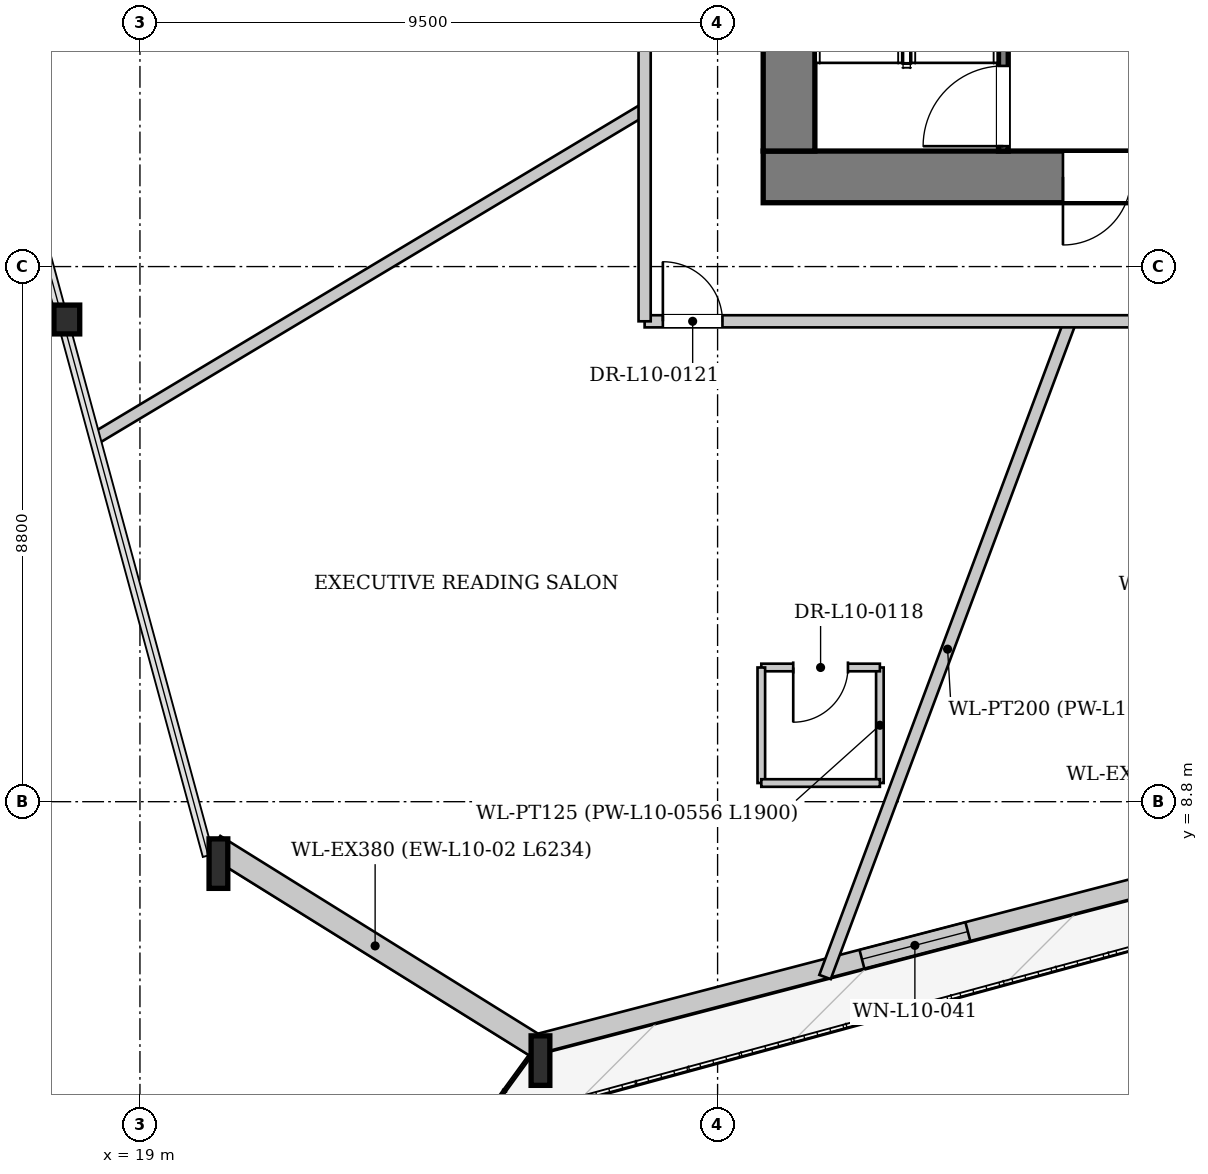
"""IFC4 building model, lengths in metres.
Left out: names, types, materials, properties, quantities, classifications, styles, units other than length and angle.
Written with IfcOpenShell. Run it as: python <this file> out.ifc"""

import sys

from ifc_helpers import new_model, si_unit, direction, frame, frame_2d, origin, origin_2d, place, context, subcontext, project, spatial, rectangle, i_section, extrude, source, transform, mapped, element, fill, save


model = new_model("IFC4")
c1 = context("Model", 3, precision=1e-05, world=origin(), true_north=direction((0.0, 1.0)))
c2 = subcontext(c1, "Body", "Model", "MODEL_VIEW")
j1 = project(units=[si_unit("LENGTHUNIT", "METRE"), si_unit("PLANEANGLEUNIT", "RADIAN")], contexts=[c1])
p1 = place(None, origin())
s1 = spatial("IfcSite", under=j1, at=p1, CompositionType="ELEMENT")
p2 = place(p1, origin())
s2 = spatial("IfcBuilding", under=s1, at=p2, CompositionType="ELEMENT")
p3 = place(p2, frame((0.0, 0.0, 43.5)))
s3 = spatial("IfcBuildingStorey", under=s2, at=p3, CompositionType="ELEMENT", Elevation=43.5)
m1 = source(origin(), c2, "Body", "SweptSolid", [
    extrude(i_section(OverallWidth=0.424, OverallDepth=0.474, WebThickness=0.043, FlangeThickness=0.068, at=origin_2d()), origin(), (0.0, 0.0, 1.0), 3.406),
])
p4 = place(p3, frame((17.685, 16.885, 0.0), z_axis=(0.065720082307, -0.090947420336, 0.993684777742), x_axis=(0.810527620102, 0.585700415787, 0.0)))
e1 = element("IfcColumn", 1, at=p4, inside=s3, PredefinedType="COLUMN", context=c2, shape_type="MappedRepresentation", body=[
    mapped(m1, transform((0.0, 0.0, 0.0), x_axis=(1.0, 0.0, 0.0), y_axis=(0.0, 1.0, 0.0), z_axis=(0.0, 0.0, 1.0), scale=1.0)),
])
m2 = source(origin(), c2, "Body", "SweptSolid", [
    extrude(i_section(OverallWidth=0.308, OverallDepth=0.814, WebThickness=0.021, FlangeThickness=0.04, at=origin_2d()), origin(), (0.0, 0.0, 1.0), 3.412),
])
p5 = place(p3, frame((20.121, 7.915, 0.0), z_axis=(0.099448612352, -0.077984883067, 0.99198202177), x_axis=(0.617071206002, 0.786907317746, 0.0)))
e2 = element("IfcColumn", 2, at=p5, inside=s3, PredefinedType="COLUMN", context=c2, shape_type="MappedRepresentation", body=[
    mapped(m2, transform((0.0, 0.0, 0.0), x_axis=(1.0, 0.0, 0.0), y_axis=(0.0, 1.0, 0.0), z_axis=(0.0, 0.0, 1.0), scale=1.0)),
])
m3 = source(origin(), c2, "Body", "SweptSolid", [
    extrude(i_section(OverallWidth=0.308, OverallDepth=0.814, WebThickness=0.021, FlangeThickness=0.04, at=origin_2d()), origin(), (0.0, 0.0, 1.0), 3.406),
])
p6 = place(p3, frame((25.414, 4.62, 0.0), z_axis=(0.101705377608, -0.045799673215, 0.993759732581), x_axis=(0.410605127545, 0.911813264454, 0.0)))
e3 = element("IfcColumn", 3, at=p6, inside=s3, PredefinedType="COLUMN", context=c2, shape_type="MappedRepresentation", body=[
    mapped(m3, transform((0.0, 0.0, 0.0), x_axis=(1.0, 0.0, 0.0), y_axis=(0.0, 1.0, 0.0), z_axis=(0.0, 0.0, 1.0), scale=1.0)),
])
p7 = place(p3, frame((49.134, 10.972, 0.0), z_axis=(0.0, 0.0, 1.0), x_axis=(-0.967626668542, -0.252385875847, 0.0)))
e4 = element("IfcWall", 4, at=p7, inside=s3, PredefinedType="SOLIDWALL", context=c2, shape_type="SweptSolid", body=[
    extrude(rectangle(XDim=24.556, YDim=0.32, at=frame_2d((12.278, 0.0))), origin(), (0.0, 0.0, 1.0), 2.592),
])
p8 = place(p7, frame((7.308, 0.0, 0.0)))
e5 = element("IfcOpeningElement", 5, at=p8, cuts=e4, PredefinedType="OPENING", context=c2, shape_type="SweptSolid", body=[
    extrude(rectangle(XDim=1.1, YDim=2.3, at=frame_2d((0.55, 1.15))), frame((0.0, 0.17, 0.0), z_axis=(0.0, -1.0, 0.0), x_axis=(1.0, 0.0, 0.0)), (0.0, 0.0, 1.0), 0.34),
])
p9 = place(p7, frame((17.071, 0.0, 0.272)))
e6 = element("IfcOpeningElement", 6, at=p9, cuts=e4, PredefinedType="OPENING", context=c2, shape_type="SweptSolid", body=[
    extrude(rectangle(XDim=1.8, YDim=2.2, at=frame_2d((0.9, 1.1))), frame((0.0, 0.17, 0.0), z_axis=(0.0, -1.0, 0.0), x_axis=(1.0, 0.0, 0.0)), (0.0, 0.0, 1.0), 0.34),
])
p10 = place(p3, frame((25.514, 4.781, 0.0), z_axis=(0.0, 0.0, 1.0), x_axis=(-0.848982430353, 0.528421075424, 0.0)))
e7 = element("IfcWall", 7, at=p10, inside=s3, PredefinedType="SOLIDWALL", context=c2, shape_type="SweptSolid", body=[
    extrude(rectangle(XDim=6.234, YDim=0.38, at=frame_2d((3.117, 0.0))), origin(), (0.0, 0.0, 1.0), 2.592),
])
p11 = place(p3, frame((46.75, 19.075, 0.0), z_axis=(0.0, 0.0, 1.0), x_axis=(-1.0, 0.0, 0.0)))
e8 = element("IfcWall", 8, at=p11, inside=s3, PredefinedType="SHEAR", context=c2, shape_type="SweptSolid", body=[
    extrude(rectangle(XDim=17.5, YDim=0.85, at=frame_2d((8.75, 0.0))), origin(), (0.0, 0.0, 1.0), 3.3),
])
p12 = place(p11, frame((4.95, 0.0, 0.0)))
e9 = element("IfcOpeningElement", 9, at=p12, cuts=e8, PredefinedType="OPENING", context=c2, shape_type="SweptSolid", body=[
    extrude(rectangle(XDim=1.12, YDim=2.25, at=frame_2d((0.56, 1.125))), frame((0.0, 0.435, 0.0), z_axis=(0.0, -1.0, 0.0), x_axis=(1.0, 0.0, 0.0)), (0.0, 0.0, 1.0), 0.87),
])
p13 = place(p11, frame((11.45, 0.0, 0.0)))
e10 = element("IfcOpeningElement", 10, at=p13, cuts=e8, PredefinedType="OPENING", context=c2, shape_type="SweptSolid", body=[
    extrude(rectangle(XDim=1.12, YDim=2.25, at=frame_2d((0.56, 1.125))), frame((0.0, 0.435, 0.0), z_axis=(0.0, -1.0, 0.0), x_axis=(1.0, 0.0, 0.0)), (0.0, 0.0, 1.0), 0.87),
])
p14 = place(p3, frame((29.675, 19.5, 0.0), z_axis=(0.0, 0.0, 1.0), x_axis=(0.0, 1.0, 0.0)))
e11 = element("IfcWall", 11, at=p14, inside=s3, PredefinedType="SHEAR", context=c2, shape_type="SweptSolid", body=[
    extrude(rectangle(XDim=14.2, YDim=0.85, at=frame_2d((7.1, 0.0))), origin(), (0.0, 0.0, 1.0), 3.3),
])
p15 = place(p14, frame((7.42, 0.0, 0.0)))
e12 = element("IfcOpeningElement", 12, at=p15, cuts=e11, PredefinedType="OPENING", context=c2, shape_type="SweptSolid", body=[
    extrude(rectangle(XDim=1.6, YDim=2.2, at=frame_2d((0.8, 1.1))), frame((0.0, 0.435, 0.0), z_axis=(0.0, -1.0, 0.0), x_axis=(1.0, 0.0, 0.0)), (0.0, 0.0, 1.0), 0.87),
])
p16 = place(p3, frame((33.2, 19.5, 0.0), z_axis=(0.0, 0.0, 1.0), x_axis=(0.0, 1.0, 0.0)))
e13 = element("IfcWall", 13, at=p16, inside=s3, PredefinedType="PARTITIONING", context=c2, shape_type="SweptSolid", body=[
    extrude(rectangle(XDim=7.46, YDim=0.16, at=frame_2d((3.73, 0.0))), origin(), (0.0, 0.0, 1.0), 3.3),
])
p17 = place(p16, frame((0.08, 0.0, 0.0)))
e14 = element("IfcOpeningElement", 14, at=p17, cuts=e13, PredefinedType="OPENING", context=c2, shape_type="SweptSolid", body=[
    extrude(rectangle(XDim=1.32, YDim=2.2, at=frame_2d((0.66, 1.1))), frame((0.0, 0.09, 0.0), z_axis=(0.0, -1.0, 0.0), x_axis=(1.0, 0.0, 0.0)), (0.0, 0.0, 1.0), 0.18),
])
p18 = place(p3, frame((34.299, 16.7, 0.0), z_axis=(0.0, 0.0, 1.0), x_axis=(-0.350212246301, -0.936670370269, 0.0)))
e15 = element("IfcWall", 15, at=p18, inside=s3, PredefinedType="PARTITIONING", context=c2, shape_type="SweptSolid", body=[
    extrude(rectangle(XDim=11.512, YDim=0.2, at=frame_2d((5.756, 0.0))), origin(), (0.0, 0.0, 1.0), 3.3),
])
p19 = place(p3, frame((27.3, 20.189, 0.0), z_axis=(0.0, 0.0, 1.0), x_axis=(-0.857808451078, -0.51396951394, 0.0)))
e16 = element("IfcWall", 16, at=p19, inside=s3, PredefinedType="PARTITIONING", context=c2, shape_type="SweptSolid", body=[
    extrude(rectangle(XDim=10.509, YDim=0.2, at=frame_2d((5.254, 0.0))), origin(), (0.0, 0.0, 1.0), 3.3),
])
p20 = place(p3, frame((31.169, 9.107, 0.0), z_axis=(0.0, 0.0, 1.0), x_axis=(0.0, 1.0, 0.0)))
e17 = element("IfcWall", 17, at=p20, inside=s3, PredefinedType="PARTITIONING", context=c2, shape_type="SweptSolid", body=[
    extrude(rectangle(XDim=1.9, YDim=0.125, at=frame_2d((0.95, 0.0))), origin(), (0.0, 0.0, 1.0), 3.3),
])
p21 = place(p3, frame((31.169, 11.007, 0.0), z_axis=(0.0, 0.0, 1.0), x_axis=(-1.0, 0.0, 0.0)))
e18 = element("IfcWall", 18, at=p21, inside=s3, PredefinedType="PARTITIONING", context=c2, shape_type="SweptSolid", body=[
    extrude(rectangle(XDim=1.95, YDim=0.125, at=frame_2d((0.975, 0.0))), origin(), (0.0, 0.0, 1.0), 3.3),
])
p22 = place(p21, frame((0.525, 0.0, 0.0)))
e19 = element("IfcOpeningElement", 19, at=p22, cuts=e18, PredefinedType="OPENING", context=c2, shape_type="SweptSolid", body=[
    extrude(rectangle(XDim=0.9, YDim=2.1, at=frame_2d((0.45, 1.05))), frame((0.0, 0.073, 0.0), z_axis=(0.0, -1.0, 0.0), x_axis=(1.0, 0.0, 0.0)), (0.0, 0.0, 1.0), 0.145),
])
p23 = place(p3, frame((29.219, 11.007, 0.0), z_axis=(0.0, 0.0, 1.0), x_axis=(0.0, -1.0, 0.0)))
e20 = element("IfcWall", 20, at=p23, inside=s3, PredefinedType="PARTITIONING", context=c2, shape_type="SweptSolid", body=[
    extrude(rectangle(XDim=1.9, YDim=0.125, at=frame_2d((0.95, 0.0))), origin(), (0.0, 0.0, 1.0), 2.795),
])
p24 = place(p3, frame((29.219, 9.107, 0.0), z_axis=(0.0, 0.0, 1.0), x_axis=(1.0, 0.0, 0.0)))
e21 = element("IfcWall", 21, at=p24, inside=s3, PredefinedType="PARTITIONING", context=c2, shape_type="SweptSolid", body=[
    extrude(rectangle(XDim=1.95, YDim=0.125, at=frame_2d((0.975, 0.0))), origin(), (0.0, 0.0, 1.0), 3.3),
])
p25 = place(p3, frame((27.3, 16.7, 0.0), z_axis=(0.0, 0.0, 1.0), x_axis=(1.0, 0.0, 0.0)))
e22 = element("IfcWall", 22, at=p25, inside=s3, PredefinedType="PARTITIONING", context=c2, shape_type="SweptSolid", body=[
    extrude(rectangle(XDim=21.4, YDim=0.2, at=frame_2d((10.7, 0.0))), origin(), (0.0, 0.0, 1.0), 3.3),
])
p26 = place(p25, frame((12.99, 0.0, 0.0)))
e23 = element("IfcOpeningElement", 23, at=p26, cuts=e22, PredefinedType="OPENING", context=c2, shape_type="SweptSolid", body=[
    extrude(rectangle(XDim=0.98, YDim=2.15, at=frame_2d((0.49, 1.075))), frame((0.0, 0.11, 0.0), z_axis=(0.0, -1.0, 0.0), x_axis=(1.0, 0.0, 0.0)), (0.0, 0.0, 1.0), 0.22),
])
p27 = place(p25, frame((20.12, 0.0, 0.0)))
e24 = element("IfcOpeningElement", 24, at=p27, cuts=e22, PredefinedType="OPENING", context=c2, shape_type="SweptSolid", body=[
    extrude(rectangle(XDim=0.98, YDim=2.15, at=frame_2d((0.49, 1.075))), frame((0.0, 0.11, 0.0), z_axis=(0.0, -1.0, 0.0), x_axis=(1.0, 0.0, 0.0)), (0.0, 0.0, 1.0), 0.22),
])
p28 = place(p25, frame((0.3, 0.0, 0.0)))
e25 = element("IfcOpeningElement", 25, at=p28, cuts=e22, PredefinedType="OPENING", context=c2, shape_type="SweptSolid", body=[
    extrude(rectangle(XDim=0.98, YDim=2.15, at=frame_2d((0.49, 1.075))), frame((0.0, 0.11, 0.0), z_axis=(0.0, -1.0, 0.0), x_axis=(1.0, 0.0, 0.0)), (0.0, 0.0, 1.0), 0.22),
])
p29 = place(p3, frame((27.3, 16.7, 0.0), z_axis=(0.0, 0.0, 1.0), x_axis=(0.0, 1.0, 0.0)))
e26 = element("IfcWall", 26, at=p29, inside=s3, PredefinedType="PARTITIONING", context=c2, shape_type="SweptSolid", body=[
    extrude(rectangle(XDim=19.8, YDim=0.2, at=frame_2d((9.9, 0.0))), origin(), (0.0, 0.0, 1.0), 3.3),
])
p30 = place(p29, frame((18.52, 0.0, 0.0)))
e27 = element("IfcOpeningElement", 27, at=p30, cuts=e26, PredefinedType="OPENING", context=c2, shape_type="SweptSolid", body=[
    extrude(rectangle(XDim=0.98, YDim=2.15, at=frame_2d((0.49, 1.075))), frame((0.0, 0.11, 0.0), z_axis=(0.0, -1.0, 0.0), x_axis=(1.0, 0.0, 0.0)), (0.0, 0.0, 1.0), 0.22),
])
p31 = place(p29, frame((5.803, 0.0, 0.0)))
e28 = element("IfcOpeningElement", 28, at=p31, cuts=e26, PredefinedType="OPENING", context=c2, shape_type="SweptSolid", body=[
    extrude(rectangle(XDim=0.98, YDim=2.15, at=frame_2d((0.49, 1.075))), frame((0.0, 0.11, 0.0), z_axis=(0.0, -1.0, 0.0), x_axis=(1.0, 0.0, 0.0)), (0.0, 0.0, 1.0), 0.22),
])
m4 = source(origin(), c2, "Body", "SweptSolid", [
    extrude(rectangle(XDim=1.8, YDim=2.2, at=frame_2d((0.9, 1.1))), frame((0.0, 0.03, 0.0), z_axis=(0.0, -1.0, 0.0), x_axis=(1.0, 0.0, 0.0)), (0.0, 0.0, 1.0), 0.06),
])
p32 = place(p9, origin())
e29 = element("IfcWindow", 29, at=p32, inside=s3, PartitioningType="SINGLE_PANEL", PredefinedType="WINDOW", context=c2, shape_type="MappedRepresentation", body=[
    mapped(m4, transform((0.0, 0.0, 0.0), x_axis=(1.0, 0.0, 0.0), y_axis=(0.0, 1.0, 0.0), z_axis=(0.0, 0.0, 1.0), scale=1.0)),
])
fill(e6, e29)
m5 = source(origin(), c2, "Body", "SweptSolid", [
    extrude(rectangle(XDim=1.12, YDim=2.25, at=frame_2d((0.56, 1.125))), frame((0.0, 0.025, 0.0), z_axis=(0.0, -1.0, 0.0), x_axis=(1.0, 0.0, 0.0)), (0.0, 0.0, 1.0), 0.05),
])
p33 = place(p13, origin())
e30 = element("IfcDoor", 30, at=p33, inside=s3, OperationType="SINGLE_SWING_RIGHT", PredefinedType="DOOR", context=c2, shape_type="MappedRepresentation", body=[
    mapped(m5, transform((0.0, 0.0, 0.0), x_axis=(1.0, 0.0, 0.0), y_axis=(0.0, 1.0, 0.0), z_axis=(0.0, 0.0, 1.0), scale=1.0)),
])
fill(e10, e30)
m6 = source(origin(), c2, "Body", "SweptSolid", [
    extrude(rectangle(XDim=1.32, YDim=2.2, at=frame_2d((0.66, 1.1))), frame((0.0, 0.025, 0.0), z_axis=(0.0, -1.0, 0.0), x_axis=(1.0, 0.0, 0.0)), (0.0, 0.0, 1.0), 0.05),
])
p34 = place(p17, origin())
e31 = element("IfcDoor", 31, at=p34, inside=s3, OperationType="SINGLE_SWING_LEFT", PredefinedType="DOOR", context=c2, shape_type="MappedRepresentation", body=[
    mapped(m6, transform((0.0, 0.0, 0.0), x_axis=(1.0, 0.0, 0.0), y_axis=(0.0, 1.0, 0.0), z_axis=(0.0, 0.0, 1.0), scale=1.0)),
])
fill(e14, e31)
m7 = source(origin(), c2, "Body", "SweptSolid", [
    extrude(rectangle(XDim=0.9, YDim=2.1, at=frame_2d((0.45, 1.05))), frame((0.0, 0.025, 0.0), z_axis=(0.0, -1.0, 0.0), x_axis=(1.0, 0.0, 0.0)), (0.0, 0.0, 1.0), 0.05),
])
p35 = place(p22, origin())
e32 = element("IfcDoor", 32, at=p35, inside=s3, OperationType="SINGLE_SWING_RIGHT", PredefinedType="DOOR", context=c2, shape_type="MappedRepresentation", body=[
    mapped(m7, transform((0.0, 0.0, 0.0), x_axis=(1.0, 0.0, 0.0), y_axis=(0.0, 1.0, 0.0), z_axis=(0.0, 0.0, 1.0), scale=1.0)),
])
fill(e19, e32)
m8 = source(origin(), c2, "Body", "SweptSolid", [
    extrude(rectangle(XDim=0.98, YDim=2.15, at=frame_2d((0.49, 1.075))), frame((0.0, 0.025, 0.0), z_axis=(0.0, -1.0, 0.0), x_axis=(1.0, 0.0, 0.0)), (0.0, 0.0, 1.0), 0.05),
])
p36 = place(p28, origin())
e33 = element("IfcDoor", 33, at=p36, inside=s3, OperationType="SINGLE_SWING_LEFT", PredefinedType="DOOR", context=c2, shape_type="MappedRepresentation", body=[
    mapped(m8, transform((0.0, 0.0, 0.0), x_axis=(1.0, 0.0, 0.0), y_axis=(0.0, 1.0, 0.0), z_axis=(0.0, 0.0, 1.0), scale=1.0)),
])
fill(e25, e33)
save(model, sys.argv[1])
